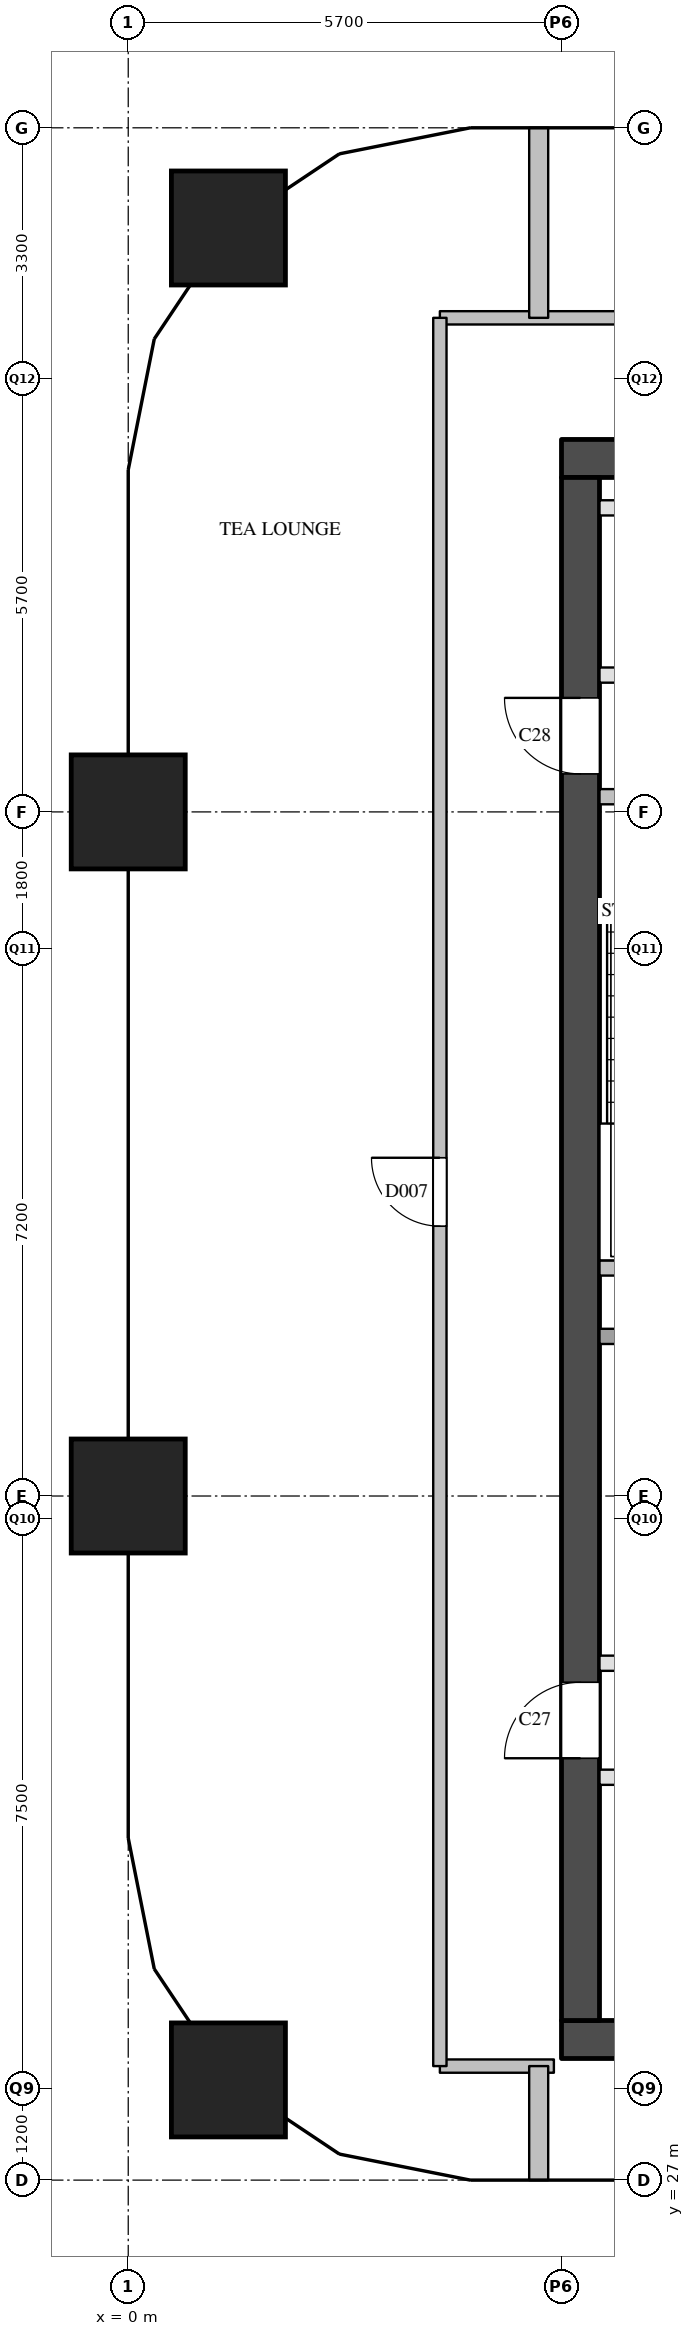
"""IFC4 building model, lengths in metres.
Left out: names, types, materials, properties, quantities, classifications, styles, units other than length and angle.
Written with IfcOpenShell. Run it as: python <this file> out.ifc"""

import sys

from ifc_helpers import new_model, si_unit, direction, frame, frame_2d, origin, origin_2d, place, context, subcontext, project, spatial, rectangle, extrude, element, fill, save


model = new_model("IFC4")
c1 = context("Model", 3, precision=1e-05, world=origin(), true_north=direction((0.0, 1.0)))
c2 = subcontext(c1, "Body", "Model", "MODEL_VIEW")
j1 = project(units=[si_unit("LENGTHUNIT", "METRE"), si_unit("PLANEANGLEUNIT", "RADIAN")], contexts=[c1])
p1 = place(None, origin())
s1 = spatial("IfcSite", under=j1, at=p1, CompositionType="ELEMENT")
p2 = place(p1, origin())
s2 = spatial("IfcBuilding", under=s1, at=p2, CompositionType="ELEMENT")
p3 = place(p2, frame((0.0, 0.0, 189.5)))
s3 = spatial("IfcBuildingStorey", under=s2, at=p3, CompositionType="ELEMENT", Elevation=189.5)
for number, where, z_axis, x_axis in (
    (1, (1.318, 28.318, 0.0), (0.0, 0.0, 1.0), (1.0, 0.0, 0.0)),
    (2, (0.0, 36.0, 0.0), (0.0, 0.0, 1.0), (1.0, 0.0, 0.0)),
    (3, (0.0, 45.0, 0.0), (0.0, 0.0, 1.0), (1.0, 0.0, 0.0)),
    (4, (1.318, 52.682, 0.0), (0.0, 0.0, 1.0), (1.0, 0.0, 0.0)),
):
    element("IfcColumn", number, at=place(p3, frame(where, z_axis=z_axis, x_axis=x_axis)), inside=s3, PredefinedType="COLUMN", context=c2, shape_type="SweptSolid", body=[
        extrude(rectangle(XDim=1.5, YDim=1.5, at=origin_2d()), origin(), (0.0, 0.0, 1.0), 3.9),
    ])
p4 = place(p3, frame((5.7, 28.85, 0.0), z_axis=(0.0, 0.0, 1.0), x_axis=(1.0, 0.0, 0.0)))
e5 = element("IfcWall", 5, at=p4, inside=s3, PredefinedType="SHEAR", context=c2, shape_type="SweptSolid", body=[
    extrude(rectangle(XDim=12.2, YDim=0.5, at=frame_2d((6.1, 0.0))), origin(), (0.0, 0.0, 1.0), 3.6),
])
p5 = place(p4, frame((9.35, 0.0, 0.0)))
e6 = element("IfcOpeningElement", 6, at=p5, cuts=e5, PredefinedType="OPENING", context=c2, shape_type="SweptSolid", body=[
    extrude(rectangle(XDim=1.2, YDim=2.1, at=frame_2d((0.6, 1.05))), frame((0.0, 0.26, 0.0), z_axis=(0.0, -1.0, 0.0), x_axis=(1.0, 0.0, 0.0)), (0.0, 0.0, 1.0), 0.52),
])
p6 = place(p3, frame((5.7, 49.65, 0.0), z_axis=(0.0, 0.0, 1.0), x_axis=(1.0, 0.0, 0.0)))
e7 = element("IfcWall", 7, at=p6, inside=s3, PredefinedType="SHEAR", context=c2, shape_type="SweptSolid", body=[
    extrude(rectangle(XDim=12.2, YDim=0.5, at=frame_2d((6.1, 0.0))), origin(), (0.0, 0.0, 1.0), 3.6),
])
p7 = place(p3, frame((5.95, 29.1, 0.0), z_axis=(0.0, 0.0, 1.0), x_axis=(0.0, 1.0, 0.0)))
e8 = element("IfcWall", 8, at=p7, inside=s3, PredefinedType="SHEAR", context=c2, shape_type="SweptSolid", body=[
    extrude(rectangle(XDim=20.3, YDim=0.5, at=frame_2d((10.15, 0.0))), origin(), (0.0, 0.0, 1.0), 3.6),
])
p8 = place(p7, frame((3.45, 0.0, 0.0)))
e9 = element("IfcOpeningElement", 9, at=p8, cuts=e8, PredefinedType="OPENING", context=c2, shape_type="SweptSolid", body=[
    extrude(rectangle(XDim=1.0, YDim=2.1, at=frame_2d((0.5, 1.05))), frame((0.0, 0.26, 0.0), z_axis=(0.0, -1.0, 0.0), x_axis=(1.0, 0.0, 0.0)), (0.0, 0.0, 1.0), 0.52),
])
p9 = place(p7, frame((16.4, 0.0, 0.0)))
e10 = element("IfcOpeningElement", 10, at=p9, cuts=e8, PredefinedType="OPENING", context=c2, shape_type="SweptSolid", body=[
    extrude(rectangle(XDim=1.0, YDim=2.1, at=frame_2d((0.5, 1.05))), frame((0.0, 0.26, 0.0), z_axis=(0.0, -1.0, 0.0), x_axis=(1.0, 0.0, 0.0)), (0.0, 0.0, 1.0), 0.52),
])
p10 = place(p3, frame((6.2, 32.3, 0.0), z_axis=(0.0, 0.0, 1.0), x_axis=(1.0, 0.0, 0.0)))
e11 = element("IfcWall", 11, at=p10, inside=s3, PredefinedType="PARTITIONING", context=c2, shape_type="SweptSolid", body=[
    extrude(rectangle(XDim=8.4, YDim=0.2, at=frame_2d((4.2, 0.0))), origin(), (0.0, 0.0, 1.0), 3.6),
])
p11 = place(p10, frame((1.86, 0.0, 0.0)))
e12 = element("IfcOpeningElement", 12, at=p11, cuts=e11, PredefinedType="OPENING", context=c2, shape_type="SweptSolid", body=[
    extrude(rectangle(XDim=0.9, YDim=2.1, at=frame_2d((0.45, 1.05))), frame((0.0, 0.11, 0.0), z_axis=(0.0, -1.0, 0.0), x_axis=(1.0, 0.0, 0.0)), (0.0, 0.0, 1.0), 0.22),
])
p12 = place(p10, frame((6.06, 0.0, 0.0)))
e13 = element("IfcOpeningElement", 13, at=p12, cuts=e11, PredefinedType="OPENING", context=c2, shape_type="SweptSolid", body=[
    extrude(rectangle(XDim=0.9, YDim=2.1, at=frame_2d((0.45, 1.05))), frame((0.0, 0.11, 0.0), z_axis=(0.0, -1.0, 0.0), x_axis=(1.0, 0.0, 0.0)), (0.0, 0.0, 1.0), 0.22),
])
p13 = place(p3, frame((6.2, 33.8, 0.0), z_axis=(0.0, 0.0, 1.0), x_axis=(1.0, 0.0, 0.0)))
e14 = element("IfcWall", 14, at=p13, inside=s3, PredefinedType="PARTITIONING", context=c2, shape_type="SweptSolid", body=[
    extrude(rectangle(XDim=8.4, YDim=0.2, at=frame_2d((4.2, 0.0))), origin(), (0.0, 0.0, 1.0), 3.6),
])
p14 = place(p13, frame((0.39, 0.0, 0.0)))
e15 = element("IfcOpeningElement", 15, at=p14, cuts=e14, PredefinedType="OPENING", context=c2, shape_type="SweptSolid", body=[
    extrude(rectangle(XDim=0.9, YDim=2.1, at=frame_2d((0.45, 1.05))), frame((0.0, 0.11, 0.0), z_axis=(0.0, -1.0, 0.0), x_axis=(1.0, 0.0, 0.0)), (0.0, 0.0, 1.0), 0.22),
])
p15 = place(p13, frame((4.59, 0.0, 0.0)))
e16 = element("IfcOpeningElement", 16, at=p15, cuts=e14, PredefinedType="OPENING", context=c2, shape_type="SweptSolid", body=[
    extrude(rectangle(XDim=0.9, YDim=2.1, at=frame_2d((0.45, 1.05))), frame((0.0, 0.11, 0.0), z_axis=(0.0, -1.0, 0.0), x_axis=(1.0, 0.0, 0.0)), (0.0, 0.0, 1.0), 0.22),
])
p16 = place(p3, frame((6.2, 38.1, 0.0), z_axis=(0.0, 0.0, 1.0), x_axis=(1.0, 0.0, 0.0)))
e17 = element("IfcWall", 17, at=p16, inside=s3, PredefinedType="SOLIDWALL", context=c2, shape_type="SweptSolid", body=[
    extrude(rectangle(XDim=11.2, YDim=0.2, at=frame_2d((5.6, 0.0))), origin(), (0.0, 0.0, 1.0), 3.6),
])
p17 = place(p16, frame((8.85, 0.0, 0.0)))
e18 = element("IfcOpeningElement", 18, at=p17, cuts=e17, PredefinedType="OPENING", context=c2, shape_type="SweptSolid", body=[
    extrude(rectangle(XDim=1.2, YDim=2.1, at=frame_2d((0.6, 1.05))), frame((0.0, 0.11, 0.0), z_axis=(0.0, -1.0, 0.0), x_axis=(1.0, 0.0, 0.0)), (0.0, 0.0, 1.0), 0.22),
])
p18 = place(p3, frame((6.2, 39.0, 0.0), z_axis=(0.0, 0.0, 1.0), x_axis=(1.0, 0.0, 0.0)))
e19 = element("IfcWall", 19, at=p18, inside=s3, PredefinedType="SOLIDWALL", context=c2, shape_type="SweptSolid", body=[
    extrude(rectangle(XDim=3.05, YDim=0.2, at=frame_2d((1.525, 0.0))), origin(), (0.0, 0.0, 1.0), 3.6),
])
p19 = place(p3, frame((6.2, 45.2, 0.0), z_axis=(0.0, 0.0, 1.0), x_axis=(1.0, 0.0, 0.0)))
e20 = element("IfcWall", 20, at=p19, inside=s3, PredefinedType="SOLIDWALL", context=c2, shape_type="SweptSolid", body=[
    extrude(rectangle(XDim=6.3, YDim=0.2, at=frame_2d((3.15, 0.0))), origin(), (0.0, 0.0, 1.0), 3.6),
])
p20 = place(p19, frame((1.025, 0.0, 0.0)))
e21 = element("IfcOpeningElement", 21, at=p20, cuts=e20, PredefinedType="OPENING", context=c2, shape_type="SweptSolid", body=[
    extrude(rectangle(XDim=1.1, YDim=2.1, at=frame_2d((0.55, 1.05))), frame((0.0, 0.11, 0.0), z_axis=(0.0, -1.0, 0.0), x_axis=(1.0, 0.0, 0.0)), (0.0, 0.0, 1.0), 0.22),
])
p21 = place(p19, frame((4.175, 0.0, 0.0)))
e22 = element("IfcOpeningElement", 22, at=p21, cuts=e20, PredefinedType="OPENING", context=c2, shape_type="SweptSolid", body=[
    extrude(rectangle(XDim=1.1, YDim=2.1, at=frame_2d((0.55, 1.05))), frame((0.0, 0.11, 0.0), z_axis=(0.0, -1.0, 0.0), x_axis=(1.0, 0.0, 0.0)), (0.0, 0.0, 1.0), 0.22),
])
p22 = place(p3, frame((6.2, 46.8, 0.0), z_axis=(0.0, 0.0, 1.0), x_axis=(1.0, 0.0, 0.0)))
e23 = element("IfcWall", 23, at=p22, inside=s3, PredefinedType="PARTITIONING", context=c2, shape_type="SweptSolid", body=[
    extrude(rectangle(XDim=11.2, YDim=0.2, at=frame_2d((5.6, 0.0))), origin(), (0.0, 0.0, 1.0), 3.6),
])
p23 = place(p22, frame((0.67, 0.0, 0.0)))
e24 = element("IfcOpeningElement", 24, at=p23, cuts=e23, PredefinedType="OPENING", context=c2, shape_type="SweptSolid", body=[
    extrude(rectangle(XDim=0.9, YDim=2.1, at=frame_2d((0.45, 1.05))), frame((0.0, 0.11, 0.0), z_axis=(0.0, -1.0, 0.0), x_axis=(1.0, 0.0, 0.0)), (0.0, 0.0, 1.0), 0.22),
])
p24 = place(p22, frame((4.59, 0.0, 0.0)))
e25 = element("IfcOpeningElement", 25, at=p24, cuts=e23, PredefinedType="OPENING", context=c2, shape_type="SweptSolid", body=[
    extrude(rectangle(XDim=0.9, YDim=2.1, at=frame_2d((0.45, 1.05))), frame((0.0, 0.11, 0.0), z_axis=(0.0, -1.0, 0.0), x_axis=(1.0, 0.0, 0.0)), (0.0, 0.0, 1.0), 0.22),
])
p25 = place(p22, frame((9.07, 0.0, 0.0)))
e26 = element("IfcOpeningElement", 26, at=p25, cuts=e23, PredefinedType="OPENING", context=c2, shape_type="SweptSolid", body=[
    extrude(rectangle(XDim=0.9, YDim=2.1, at=frame_2d((0.45, 1.05))), frame((0.0, 0.11, 0.0), z_axis=(0.0, -1.0, 0.0), x_axis=(1.0, 0.0, 0.0)), (0.0, 0.0, 1.0), 0.22),
])
p26 = place(p3, frame((6.2, 49.0, 0.0), z_axis=(0.0, 0.0, 1.0), x_axis=(1.0, 0.0, 0.0)))
e27 = element("IfcWall", 27, at=p26, inside=s3, PredefinedType="PARTITIONING", context=c2, shape_type="SweptSolid", body=[
    extrude(rectangle(XDim=11.2, YDim=0.2, at=frame_2d((5.6, 0.0))), origin(), (0.0, 0.0, 1.0), 3.6),
])
p27 = place(p3, frame((4.1, 28.5, 0.0), z_axis=(0.0, 0.0, 1.0), x_axis=(1.0, 0.0, 0.0)))
e28 = element("IfcWall", 28, at=p27, inside=s3, PredefinedType="PARTITIONING", context=c2, shape_type="SweptSolid", body=[
    extrude(rectangle(XDim=1.5, YDim=0.175, at=frame_2d((0.75, 0.0))), origin(), (0.0, 0.0, 1.0), 3.6),
])
p28 = place(p3, frame((4.1, 51.5, 0.0), z_axis=(0.0, 0.0, 1.0), x_axis=(1.0, 0.0, 0.0)))
e29 = element("IfcWall", 29, at=p28, inside=s3, PredefinedType="PARTITIONING", context=c2, shape_type="SweptSolid", body=[
    extrude(rectangle(XDim=15.4, YDim=0.175, at=frame_2d((7.7, 0.0))), origin(), (0.0, 0.0, 1.0), 3.6),
])
p29 = place(p28, frame((7.9, 0.0, 0.0)))
e30 = element("IfcOpeningElement", 30, at=p29, cuts=e29, PredefinedType="OPENING", context=c2, shape_type="SweptSolid", body=[
    extrude(rectangle(XDim=0.9, YDim=2.1, at=frame_2d((0.45, 1.05))), frame((0.0, 0.097, 0.0), z_axis=(0.0, -1.0, 0.0), x_axis=(1.0, 0.0, 0.0)), (0.0, 0.0, 1.0), 0.195),
])
p30 = place(p3, frame((4.1, 28.5, 0.0), z_axis=(0.0, 0.0, 1.0), x_axis=(0.0, 1.0, 0.0)))
e31 = element("IfcWall", 31, at=p30, inside=s3, PredefinedType="PARTITIONING", context=c2, shape_type="SweptSolid", body=[
    extrude(rectangle(XDim=23.0, YDim=0.175, at=frame_2d((11.5, 0.0))), origin(), (0.0, 0.0, 1.0), 3.6),
])
p31 = place(p30, frame((11.05, 0.0, 0.0)))
e32 = element("IfcOpeningElement", 32, at=p31, cuts=e31, PredefinedType="OPENING", context=c2, shape_type="SweptSolid", body=[
    extrude(rectangle(XDim=0.9, YDim=2.1, at=frame_2d((0.45, 1.05))), frame((0.0, 0.097, 0.0), z_axis=(0.0, -1.0, 0.0), x_axis=(1.0, 0.0, 0.0)), (0.0, 0.0, 1.0), 0.195),
])
p32 = place(p3, frame((5.4, 27.0, 0.0), z_axis=(0.0, 0.0, 1.0), x_axis=(0.0, 1.0, 0.0)))
e33 = element("IfcWall", 33, at=p32, inside=s3, PredefinedType="PARTITIONING", context=c2, shape_type="SweptSolid", body=[
    extrude(rectangle(XDim=1.5, YDim=0.25, at=frame_2d((0.75, 0.0))), origin(), (0.0, 0.0, 1.0), 2.6),
])
p33 = place(p3, frame((5.4, 51.5, 0.0), z_axis=(0.0, 0.0, 1.0), x_axis=(0.0, 1.0, 0.0)))
e34 = element("IfcWall", 34, at=p33, inside=s3, PredefinedType="PARTITIONING", context=c2, shape_type="SweptSolid", body=[
    extrude(rectangle(XDim=2.5, YDim=0.25, at=frame_2d((1.25, 0.0))), origin(), (0.0, 0.0, 1.0), 2.6),
])
p34 = place(p8, origin())
e35 = element("IfcDoor", 35, at=p34, inside=s3, OperationType="SINGLE_SWING_LEFT", PredefinedType="DOOR", context=c2, shape_type="SweptSolid", body=[
    extrude(rectangle(XDim=1.0, YDim=2.1, at=frame_2d((0.5, 1.05))), frame((0.0, 0.025, 0.0), z_axis=(0.0, -1.0, 0.0), x_axis=(1.0, 0.0, 0.0)), (0.0, 0.0, 1.0), 0.05),
])
fill(e9, e35)
p35 = place(p9, origin())
e36 = element("IfcDoor", 36, at=p35, inside=s3, OperationType="SINGLE_SWING_RIGHT", PredefinedType="DOOR", context=c2, shape_type="SweptSolid", body=[
    extrude(rectangle(XDim=1.0, YDim=2.1, at=frame_2d((0.5, 1.05))), frame((0.0, 0.025, 0.0), z_axis=(0.0, -1.0, 0.0), x_axis=(1.0, 0.0, 0.0)), (0.0, 0.0, 1.0), 0.05),
])
fill(e10, e36)
p36 = place(p31, origin())
e37 = element("IfcDoor", 37, at=p36, inside=s3, OperationType="SINGLE_SWING_RIGHT", PredefinedType="DOOR", context=c2, shape_type="SweptSolid", body=[
    extrude(rectangle(XDim=0.9, YDim=2.1, at=frame_2d((0.45, 1.05))), frame((0.0, 0.025, 0.0), z_axis=(0.0, -1.0, 0.0), x_axis=(1.0, 0.0, 0.0)), (0.0, 0.0, 1.0), 0.05),
])
fill(e32, e37)
save(model, sys.argv[1])
